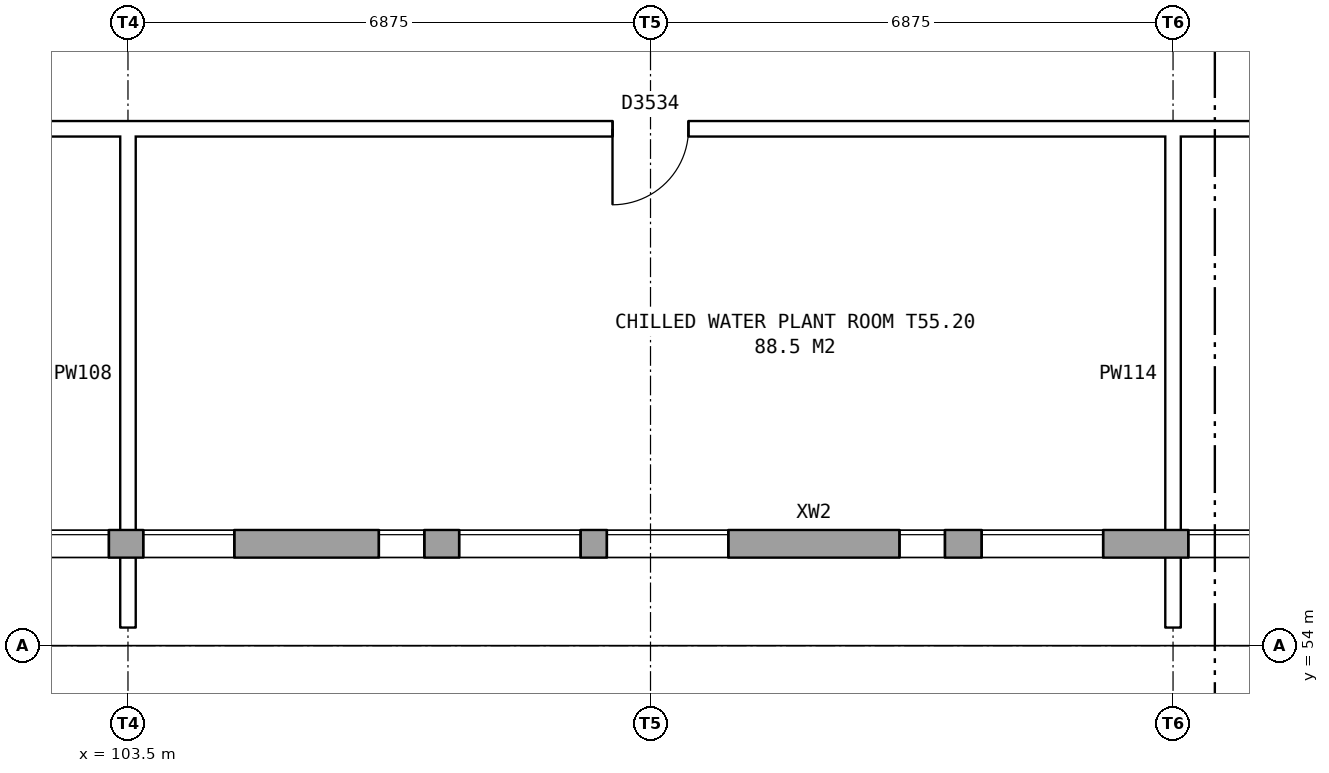
"""IFC4 building model, lengths in metres.
Left out: names, types, materials, properties, quantities, classifications, styles, units other than length and angle.
Written with IfcOpenShell. Run it as: python <this file> out.ifc"""

import sys

from ifc_helpers import new_model, si_unit, direction, frame, frame_2d, origin, place, context, subcontext, project, spatial, rectangle, extrude, element, fill, save


model = new_model("IFC4")
c1 = context("Model", 3, precision=1e-05, world=origin(), true_north=direction((0.0, 1.0)))
c2 = subcontext(c1, "Body", "Model", "MODEL_VIEW")
j1 = project(units=[si_unit("LENGTHUNIT", "METRE"), si_unit("PLANEANGLEUNIT", "RADIAN")], contexts=[c1])
p1 = place(None, origin())
s1 = spatial("IfcSite", under=j1, at=p1, CompositionType="ELEMENT")
p2 = place(p1, origin())
s2 = spatial("IfcBuilding", under=s1, at=p2, CompositionType="ELEMENT")
p3 = place(p2, frame((0.0, 0.0, 194.4)))
s3 = spatial("IfcBuildingStorey", under=s2, at=p3, CompositionType="ELEMENT", Elevation=194.4)
p4 = place(p3, frame((76.15, 55.34, 0.0), z_axis=(0.0, 0.0, 1.0), x_axis=(1.0, 0.0, 0.0)))
e1 = element("IfcWall", 1, at=p4, inside=s3, PredefinedType="STANDARD", context=c2, shape_type="SweptSolid", body=[
    extrude(rectangle(XDim=54.7, YDim=0.36, at=frame_2d((27.35, 0.0))), origin(), (0.0, 0.0, 1.0), 3.95),
])
p5 = place(p4, frame((0.769, 0.0, 1.5)))
e2 = element("IfcOpeningElement", 2, at=p5, cuts=e1, PredefinedType="OPENING", context=c2, shape_type="SweptSolid", body=[
    extrude(rectangle(XDim=1.6, YDim=1.2, at=frame_2d((0.8, 0.6))), frame((0.0, 0.19, 0.0), z_axis=(0.0, -1.0, 0.0), x_axis=(1.0, 0.0, 0.0)), (0.0, 0.0, 1.0), 0.38),
])
p6 = place(p4, frame((2.7, 0.0, 1.5)))
e3 = element("IfcOpeningElement", 3, at=p6, cuts=e1, PredefinedType="OPENING", context=c2, shape_type="SweptSolid", body=[
    extrude(rectangle(XDim=0.6, YDim=1.2, at=frame_2d((0.3, 0.6))), frame((0.0, 0.19, 0.0), z_axis=(0.0, -1.0, 0.0), x_axis=(1.0, 0.0, 0.0)), (0.0, 0.0, 1.0), 0.38),
])
p7 = place(p4, frame((7.644, 0.0, 1.5)))
e4 = element("IfcOpeningElement", 4, at=p7, cuts=e1, PredefinedType="OPENING", context=c2, shape_type="SweptSolid", body=[
    extrude(rectangle(XDim=1.6, YDim=1.2, at=frame_2d((0.8, 0.6))), frame((0.0, 0.19, 0.0), z_axis=(0.0, -1.0, 0.0), x_axis=(1.0, 0.0, 0.0)), (0.0, 0.0, 1.0), 0.38),
])
p8 = place(p4, frame((5.3, 0.0, 1.5)))
e5 = element("IfcOpeningElement", 5, at=p8, cuts=e1, PredefinedType="OPENING", context=c2, shape_type="SweptSolid", body=[
    extrude(rectangle(XDim=1.6, YDim=1.2, at=frame_2d((0.8, 0.6))), frame((0.0, 0.19, 0.0), z_axis=(0.0, -1.0, 0.0), x_axis=(1.0, 0.0, 0.0)), (0.0, 0.0, 1.0), 0.38),
])
p9 = place(p4, frame((14.519, 0.0, 1.5)))
e6 = element("IfcOpeningElement", 6, at=p9, cuts=e1, PredefinedType="OPENING", context=c2, shape_type="SweptSolid", body=[
    extrude(rectangle(XDim=1.6, YDim=1.2, at=frame_2d((0.8, 0.6))), frame((0.0, 0.19, 0.0), z_axis=(0.0, -1.0, 0.0), x_axis=(1.0, 0.0, 0.0)), (0.0, 0.0, 1.0), 0.38),
])
p10 = place(p4, frame((16.45, 0.0, 1.5)))
e7 = element("IfcOpeningElement", 7, at=p10, cuts=e1, PredefinedType="OPENING", context=c2, shape_type="SweptSolid", body=[
    extrude(rectangle(XDim=0.6, YDim=1.2, at=frame_2d((0.3, 0.6))), frame((0.0, 0.19, 0.0), z_axis=(0.0, -1.0, 0.0), x_axis=(1.0, 0.0, 0.0)), (0.0, 0.0, 1.0), 0.38),
])
p11 = place(p4, frame((21.394, 0.0, 1.5)))
e8 = element("IfcOpeningElement", 8, at=p11, cuts=e1, PredefinedType="OPENING", context=c2, shape_type="SweptSolid", body=[
    extrude(rectangle(XDim=1.6, YDim=1.2, at=frame_2d((0.8, 0.6))), frame((0.0, 0.19, 0.0), z_axis=(0.0, -1.0, 0.0), x_axis=(1.0, 0.0, 0.0)), (0.0, 0.0, 1.0), 0.38),
])
p12 = place(p4, frame((19.05, 0.0, 1.5)))
e9 = element("IfcOpeningElement", 9, at=p12, cuts=e1, PredefinedType="OPENING", context=c2, shape_type="SweptSolid", body=[
    extrude(rectangle(XDim=1.6, YDim=1.2, at=frame_2d((0.8, 0.6))), frame((0.0, 0.19, 0.0), z_axis=(0.0, -1.0, 0.0), x_axis=(1.0, 0.0, 0.0)), (0.0, 0.0, 1.0), 0.38),
])
p13 = place(p4, frame((27.55, 0.0, 1.5)))
e10 = element("IfcOpeningElement", 10, at=p13, cuts=e1, PredefinedType="OPENING", context=c2, shape_type="SweptSolid", body=[
    extrude(rectangle(XDim=1.2, YDim=1.2, at=frame_2d((0.6, 0.6))), frame((0.0, 0.19, 0.0), z_axis=(0.0, -1.0, 0.0), x_axis=(1.0, 0.0, 0.0)), (0.0, 0.0, 1.0), 0.38),
])
p14 = place(p4, frame((31.706, 0.0, 1.5)))
e11 = element("IfcOpeningElement", 11, at=p14, cuts=e1, PredefinedType="OPENING", context=c2, shape_type="SweptSolid", body=[
    extrude(rectangle(XDim=1.6, YDim=1.2, at=frame_2d((0.8, 0.6))), frame((0.0, 0.19, 0.0), z_axis=(0.0, -1.0, 0.0), x_axis=(1.0, 0.0, 0.0)), (0.0, 0.0, 1.0), 0.38),
])
p15 = place(p4, frame((30.65, 0.0, 1.5)))
e12 = element("IfcOpeningElement", 12, at=p15, cuts=e1, PredefinedType="OPENING", context=c2, shape_type="SweptSolid", body=[
    extrude(rectangle(XDim=0.6, YDim=1.2, at=frame_2d((0.3, 0.6))), frame((0.0, 0.19, 0.0), z_axis=(0.0, -1.0, 0.0), x_axis=(1.0, 0.0, 0.0)), (0.0, 0.0, 1.0), 0.38),
])
p16 = place(p4, frame((38.581, 0.0, 1.5)))
e13 = element("IfcOpeningElement", 13, at=p16, cuts=e1, PredefinedType="OPENING", context=c2, shape_type="SweptSolid", body=[
    extrude(rectangle(XDim=1.6, YDim=1.2, at=frame_2d((0.8, 0.6))), frame((0.0, 0.19, 0.0), z_axis=(0.0, -1.0, 0.0), x_axis=(1.0, 0.0, 0.0)), (0.0, 0.0, 1.0), 0.38),
])
p17 = place(p4, frame((41.3, 0.0, 1.5)))
e14 = element("IfcOpeningElement", 14, at=p17, cuts=e1, PredefinedType="OPENING", context=c2, shape_type="SweptSolid", body=[
    extrude(rectangle(XDim=1.2, YDim=1.2, at=frame_2d((0.6, 0.6))), frame((0.0, 0.19, 0.0), z_axis=(0.0, -1.0, 0.0), x_axis=(1.0, 0.0, 0.0)), (0.0, 0.0, 1.0), 0.38),
])
p18 = place(p4, frame((45.456, 0.0, 1.5)))
e15 = element("IfcOpeningElement", 15, at=p18, cuts=e1, PredefinedType="OPENING", context=c2, shape_type="SweptSolid", body=[
    extrude(rectangle(XDim=1.6, YDim=1.2, at=frame_2d((0.8, 0.6))), frame((0.0, 0.19, 0.0), z_axis=(0.0, -1.0, 0.0), x_axis=(1.0, 0.0, 0.0)), (0.0, 0.0, 1.0), 0.38),
])
p19 = place(p4, frame((44.4, 0.0, 1.5)))
e16 = element("IfcOpeningElement", 16, at=p19, cuts=e1, PredefinedType="OPENING", context=c2, shape_type="SweptSolid", body=[
    extrude(rectangle(XDim=0.6, YDim=1.2, at=frame_2d((0.3, 0.6))), frame((0.0, 0.19, 0.0), z_axis=(0.0, -1.0, 0.0), x_axis=(1.0, 0.0, 0.0)), (0.0, 0.0, 1.0), 0.38),
])
p20 = place(p4, frame((52.331, 0.0, 1.5)))
e17 = element("IfcOpeningElement", 17, at=p20, cuts=e1, PredefinedType="OPENING", context=c2, shape_type="SweptSolid", body=[
    extrude(rectangle(XDim=1.6, YDim=1.2, at=frame_2d((0.8, 0.6))), frame((0.0, 0.19, 0.0), z_axis=(0.0, -1.0, 0.0), x_axis=(1.0, 0.0, 0.0)), (0.0, 0.0, 1.0), 0.38),
])
p21 = place(p4, frame((9.55, 0.0, 1.5)))
e18 = element("IfcOpeningElement", 18, at=p21, cuts=e1, PredefinedType="OPENING", context=c2, shape_type="SweptSolid", body=[
    extrude(rectangle(XDim=0.6, YDim=1.2, at=frame_2d((0.3, 0.6))), frame((0.0, 0.19, 0.0), z_axis=(0.0, -1.0, 0.0), x_axis=(1.0, 0.0, 0.0)), (0.0, 0.0, 1.0), 0.38),
])
p22 = place(p4, frame((12.15, 0.0, 1.5)))
e19 = element("IfcOpeningElement", 19, at=p22, cuts=e1, PredefinedType="OPENING", context=c2, shape_type="SweptSolid", body=[
    extrude(rectangle(XDim=1.2, YDim=1.2, at=frame_2d((0.6, 0.6))), frame((0.0, 0.19, 0.0), z_axis=(0.0, -1.0, 0.0), x_axis=(1.0, 0.0, 0.0)), (0.0, 0.0, 1.0), 0.38),
])
p23 = place(p4, frame((23.3, 0.0, 1.5)))
e20 = element("IfcOpeningElement", 20, at=p23, cuts=e1, PredefinedType="OPENING", context=c2, shape_type="SweptSolid", body=[
    extrude(rectangle(XDim=0.6, YDim=1.2, at=frame_2d((0.3, 0.6))), frame((0.0, 0.19, 0.0), z_axis=(0.0, -1.0, 0.0), x_axis=(1.0, 0.0, 0.0)), (0.0, 0.0, 1.0), 0.38),
])
p24 = place(p4, frame((25.9, 0.0, 1.5)))
e21 = element("IfcOpeningElement", 21, at=p24, cuts=e1, PredefinedType="OPENING", context=c2, shape_type="SweptSolid", body=[
    extrude(rectangle(XDim=1.2, YDim=1.2, at=frame_2d((0.6, 0.6))), frame((0.0, 0.19, 0.0), z_axis=(0.0, -1.0, 0.0), x_axis=(1.0, 0.0, 0.0)), (0.0, 0.0, 1.0), 0.38),
])
p25 = place(p4, frame((33.65, 0.0, 1.5)))
e22 = element("IfcOpeningElement", 22, at=p25, cuts=e1, PredefinedType="OPENING", context=c2, shape_type="SweptSolid", body=[
    extrude(rectangle(XDim=1.6, YDim=1.2, at=frame_2d((0.8, 0.6))), frame((0.0, 0.19, 0.0), z_axis=(0.0, -1.0, 0.0), x_axis=(1.0, 0.0, 0.0)), (0.0, 0.0, 1.0), 0.38),
])
p26 = place(p4, frame((37.5, 0.0, 1.5)))
e23 = element("IfcOpeningElement", 23, at=p26, cuts=e1, PredefinedType="OPENING", context=c2, shape_type="SweptSolid", body=[
    extrude(rectangle(XDim=0.6, YDim=1.2, at=frame_2d((0.3, 0.6))), frame((0.0, 0.19, 0.0), z_axis=(0.0, -1.0, 0.0), x_axis=(1.0, 0.0, 0.0)), (0.0, 0.0, 1.0), 0.38),
])
p27 = place(p4, frame((47.4, 0.0, 1.5)))
e24 = element("IfcOpeningElement", 24, at=p27, cuts=e1, PredefinedType="OPENING", context=c2, shape_type="SweptSolid", body=[
    extrude(rectangle(XDim=1.6, YDim=1.2, at=frame_2d((0.8, 0.6))), frame((0.0, 0.19, 0.0), z_axis=(0.0, -1.0, 0.0), x_axis=(1.0, 0.0, 0.0)), (0.0, 0.0, 1.0), 0.38),
])
p28 = place(p4, frame((51.25, 0.0, 1.5)))
e25 = element("IfcOpeningElement", 25, at=p28, cuts=e1, PredefinedType="OPENING", context=c2, shape_type="SweptSolid", body=[
    extrude(rectangle(XDim=0.6, YDim=1.2, at=frame_2d((0.3, 0.6))), frame((0.0, 0.19, 0.0), z_axis=(0.0, -1.0, 0.0), x_axis=(1.0, 0.0, 0.0)), (0.0, 0.0, 1.0), 0.38),
])
p29 = place(p3, frame((32.24, 60.8, 0.0), z_axis=(0.0, 0.0, 1.0), x_axis=(1.0, 0.0, 0.0)))
e26 = element("IfcWall", 26, at=p29, inside=s3, PredefinedType="PARTITIONING", context=c2, shape_type="SweptSolid", body=[
    extrude(rectangle(XDim=136.52, YDim=0.2, at=frame_2d((68.26, 0.0))), origin(), (0.0, 0.0, 1.0), 3.95),
])
p30 = place(p29, frame((3.44, 0.0, 0.0)))
e27 = element("IfcOpeningElement", 27, at=p30, cuts=e26, PredefinedType="OPENING", context=c2, shape_type="SweptSolid", body=[
    extrude(rectangle(XDim=1.0, YDim=2.1, at=frame_2d((0.5, 1.05))), frame((0.0, 0.11, 0.0), z_axis=(0.0, -1.0, 0.0), x_axis=(1.0, 0.0, 0.0)), (0.0, 0.0, 1.0), 0.22),
])
p31 = place(p29, frame((13.26, 0.0, 0.0)))
e28 = element("IfcOpeningElement", 28, at=p31, cuts=e26, PredefinedType="OPENING", context=c2, shape_type="SweptSolid", body=[
    extrude(rectangle(XDim=1.0, YDim=2.1, at=frame_2d((0.5, 1.05))), frame((0.0, 0.11, 0.0), z_axis=(0.0, -1.0, 0.0), x_axis=(1.0, 0.0, 0.0)), (0.0, 0.0, 1.0), 0.22),
])
p32 = place(p29, frame((25.26, 0.0, 0.0)))
e29 = element("IfcOpeningElement", 29, at=p32, cuts=e26, PredefinedType="OPENING", context=c2, shape_type="SweptSolid", body=[
    extrude(rectangle(XDim=1.0, YDim=2.1, at=frame_2d((0.5, 1.05))), frame((0.0, 0.11, 0.0), z_axis=(0.0, -1.0, 0.0), x_axis=(1.0, 0.0, 0.0)), (0.0, 0.0, 1.0), 0.22),
])
p33 = place(p29, frame((37.08, 0.0, 0.0)))
e30 = element("IfcOpeningElement", 30, at=p33, cuts=e26, PredefinedType="OPENING", context=c2, shape_type="SweptSolid", body=[
    extrude(rectangle(XDim=1.0, YDim=2.1, at=frame_2d((0.5, 1.05))), frame((0.0, 0.11, 0.0), z_axis=(0.0, -1.0, 0.0), x_axis=(1.0, 0.0, 0.0)), (0.0, 0.0, 1.0), 0.22),
])
p34 = place(p29, frame((49.955, 0.0, 0.0)))
e31 = element("IfcOpeningElement", 31, at=p34, cuts=e26, PredefinedType="OPENING", context=c2, shape_type="SweptSolid", body=[
    extrude(rectangle(XDim=1.0, YDim=2.1, at=frame_2d((0.5, 1.05))), frame((0.0, 0.11, 0.0), z_axis=(0.0, -1.0, 0.0), x_axis=(1.0, 0.0, 0.0)), (0.0, 0.0, 1.0), 0.22),
])
p35 = place(p29, frame((63.885, 0.0, 0.0)))
e32 = element("IfcOpeningElement", 32, at=p35, cuts=e26, PredefinedType="OPENING", context=c2, shape_type="SweptSolid", body=[
    extrude(rectangle(XDim=1.0, YDim=2.1, at=frame_2d((0.5, 1.05))), frame((0.0, 0.11, 0.0), z_axis=(0.0, -1.0, 0.0), x_axis=(1.0, 0.0, 0.0)), (0.0, 0.0, 1.0), 0.22),
])
p36 = place(p29, frame((77.635, 0.0, 0.0)))
e33 = element("IfcOpeningElement", 33, at=p36, cuts=e26, PredefinedType="OPENING", context=c2, shape_type="SweptSolid", body=[
    extrude(rectangle(XDim=1.0, YDim=2.1, at=frame_2d((0.5, 1.05))), frame((0.0, 0.11, 0.0), z_axis=(0.0, -1.0, 0.0), x_axis=(1.0, 0.0, 0.0)), (0.0, 0.0, 1.0), 0.22),
])
p37 = place(p29, frame((91.565, 0.0, 0.0)))
e34 = element("IfcOpeningElement", 34, at=p37, cuts=e26, PredefinedType="OPENING", context=c2, shape_type="SweptSolid", body=[
    extrude(rectangle(XDim=1.0, YDim=2.1, at=frame_2d((0.5, 1.05))), frame((0.0, 0.11, 0.0), z_axis=(0.0, -1.0, 0.0), x_axis=(1.0, 0.0, 0.0)), (0.0, 0.0, 1.0), 0.22),
])
p38 = place(p29, frame((104.44, 0.0, 0.0)))
e35 = element("IfcOpeningElement", 35, at=p38, cuts=e26, PredefinedType="OPENING", context=c2, shape_type="SweptSolid", body=[
    extrude(rectangle(XDim=1.0, YDim=2.1, at=frame_2d((0.5, 1.05))), frame((0.0, 0.11, 0.0), z_axis=(0.0, -1.0, 0.0), x_axis=(1.0, 0.0, 0.0)), (0.0, 0.0, 1.0), 0.22),
])
p39 = place(p29, frame((116.26, 0.0, 0.0)))
e36 = element("IfcOpeningElement", 36, at=p39, cuts=e26, PredefinedType="OPENING", context=c2, shape_type="SweptSolid", body=[
    extrude(rectangle(XDim=1.0, YDim=2.1, at=frame_2d((0.5, 1.05))), frame((0.0, 0.11, 0.0), z_axis=(0.0, -1.0, 0.0), x_axis=(1.0, 0.0, 0.0)), (0.0, 0.0, 1.0), 0.22),
])
p40 = place(p29, frame((129.08, 0.0, 0.0)))
e37 = element("IfcOpeningElement", 37, at=p40, cuts=e26, PredefinedType="OPENING", context=c2, shape_type="SweptSolid", body=[
    extrude(rectangle(XDim=1.0, YDim=2.1, at=frame_2d((0.5, 1.05))), frame((0.0, 0.11, 0.0), z_axis=(0.0, -1.0, 0.0), x_axis=(1.0, 0.0, 0.0)), (0.0, 0.0, 1.0), 0.22),
])
for number, where, z_axis, x_axis in (
    (38, (103.5, 54.24, 0.0), (0.0, 0.0, 1.0), (0.0, 1.0, 0.0)),
    (39, (117.25, 54.24, 0.0), (0.0, 0.0, 1.0), (0.0, 1.0, 0.0)),
):
    element("IfcWall", number, at=place(p3, frame(where, z_axis=z_axis, x_axis=x_axis)), inside=s3, PredefinedType="PARTITIONING", context=c2, shape_type="SweptSolid", body=[
        extrude(rectangle(XDim=6.66, YDim=0.2, at=frame_2d((3.33, 0.0))), origin(), (0.0, 0.0, 1.0), 3.417),
    ])
p41 = place(p13, origin())
e40 = element("IfcWindow", 40, at=p41, inside=s3, PartitioningType="DOUBLE_PANEL_HORIZONTAL", PredefinedType="WINDOW", context=c2, shape_type="SweptSolid", body=[
    extrude(rectangle(XDim=1.2, YDim=1.2, at=frame_2d((0.6, 0.6))), frame((0.0, 0.15, 0.0), z_axis=(0.0, -1.0, 0.0), x_axis=(1.0, 0.0, 0.0)), (0.0, 0.0, 1.0), 0.06),
])
fill(e10, e40)
p42 = place(p14, origin())
e41 = element("IfcWindow", 41, at=p42, inside=s3, PartitioningType="DOUBLE_PANEL_HORIZONTAL", PredefinedType="WINDOW", context=c2, shape_type="SweptSolid", body=[
    extrude(rectangle(XDim=1.6, YDim=1.2, at=frame_2d((0.8, 0.6))), frame((0.0, 0.15, 0.0), z_axis=(0.0, -1.0, 0.0), x_axis=(1.0, 0.0, 0.0)), (0.0, 0.0, 1.0), 0.06),
])
fill(e11, e41)
p43 = place(p15, origin())
e42 = element("IfcWindow", 42, at=p43, inside=s3, PartitioningType="DOUBLE_PANEL_HORIZONTAL", PredefinedType="WINDOW", context=c2, shape_type="SweptSolid", body=[
    extrude(rectangle(XDim=0.6, YDim=1.2, at=frame_2d((0.3, 0.6))), frame((0.0, 0.15, 0.0), z_axis=(0.0, -1.0, 0.0), x_axis=(1.0, 0.0, 0.0)), (0.0, 0.0, 1.0), 0.06),
])
fill(e12, e42)
p44 = place(p16, origin())
e43 = element("IfcWindow", 43, at=p44, inside=s3, PartitioningType="DOUBLE_PANEL_HORIZONTAL", PredefinedType="WINDOW", context=c2, shape_type="SweptSolid", body=[
    extrude(rectangle(XDim=1.6, YDim=1.2, at=frame_2d((0.8, 0.6))), frame((0.0, 0.15, 0.0), z_axis=(0.0, -1.0, 0.0), x_axis=(1.0, 0.0, 0.0)), (0.0, 0.0, 1.0), 0.06),
])
fill(e13, e43)
p45 = place(p17, origin())
e44 = element("IfcWindow", 44, at=p45, inside=s3, PartitioningType="DOUBLE_PANEL_HORIZONTAL", PredefinedType="WINDOW", context=c2, shape_type="SweptSolid", body=[
    extrude(rectangle(XDim=1.2, YDim=1.2, at=frame_2d((0.6, 0.6))), frame((0.0, 0.15, 0.0), z_axis=(0.0, -1.0, 0.0), x_axis=(1.0, 0.0, 0.0)), (0.0, 0.0, 1.0), 0.06),
])
fill(e14, e44)
p46 = place(p36, frame((1.0, 0.0, 0.0), z_axis=(0.0, 0.0, 1.0), x_axis=(-1.0, 0.0, 0.0)))
e45 = element("IfcDoor", 45, at=p46, inside=s3, OperationType="SINGLE_SWING_RIGHT", PredefinedType="DOOR", context=c2, shape_type="SweptSolid", body=[
    extrude(rectangle(XDim=1.0, YDim=2.1, at=frame_2d((0.5, 1.05))), frame((0.0, 0.025, 0.0), z_axis=(0.0, -1.0, 0.0), x_axis=(1.0, 0.0, 0.0)), (0.0, 0.0, 1.0), 0.05),
])
fill(e33, e45)
p47 = place(p24, origin())
e46 = element("IfcWindow", 46, at=p47, inside=s3, PartitioningType="DOUBLE_PANEL_HORIZONTAL", PredefinedType="WINDOW", context=c2, shape_type="SweptSolid", body=[
    extrude(rectangle(XDim=1.2, YDim=1.2, at=frame_2d((0.6, 0.6))), frame((0.0, 0.15, 0.0), z_axis=(0.0, -1.0, 0.0), x_axis=(1.0, 0.0, 0.0)), (0.0, 0.0, 1.0), 0.06),
])
fill(e21, e46)
p48 = place(p25, origin())
e47 = element("IfcWindow", 47, at=p48, inside=s3, PartitioningType="DOUBLE_PANEL_HORIZONTAL", PredefinedType="WINDOW", context=c2, shape_type="SweptSolid", body=[
    extrude(rectangle(XDim=1.6, YDim=1.2, at=frame_2d((0.8, 0.6))), frame((0.0, 0.15, 0.0), z_axis=(0.0, -1.0, 0.0), x_axis=(1.0, 0.0, 0.0)), (0.0, 0.0, 1.0), 0.06),
])
fill(e22, e47)
p49 = place(p26, origin())
e48 = element("IfcWindow", 48, at=p49, inside=s3, PartitioningType="DOUBLE_PANEL_HORIZONTAL", PredefinedType="WINDOW", context=c2, shape_type="SweptSolid", body=[
    extrude(rectangle(XDim=0.6, YDim=1.2, at=frame_2d((0.3, 0.6))), frame((0.0, 0.15, 0.0), z_axis=(0.0, -1.0, 0.0), x_axis=(1.0, 0.0, 0.0)), (0.0, 0.0, 1.0), 0.06),
])
fill(e23, e48)
save(model, sys.argv[1])
